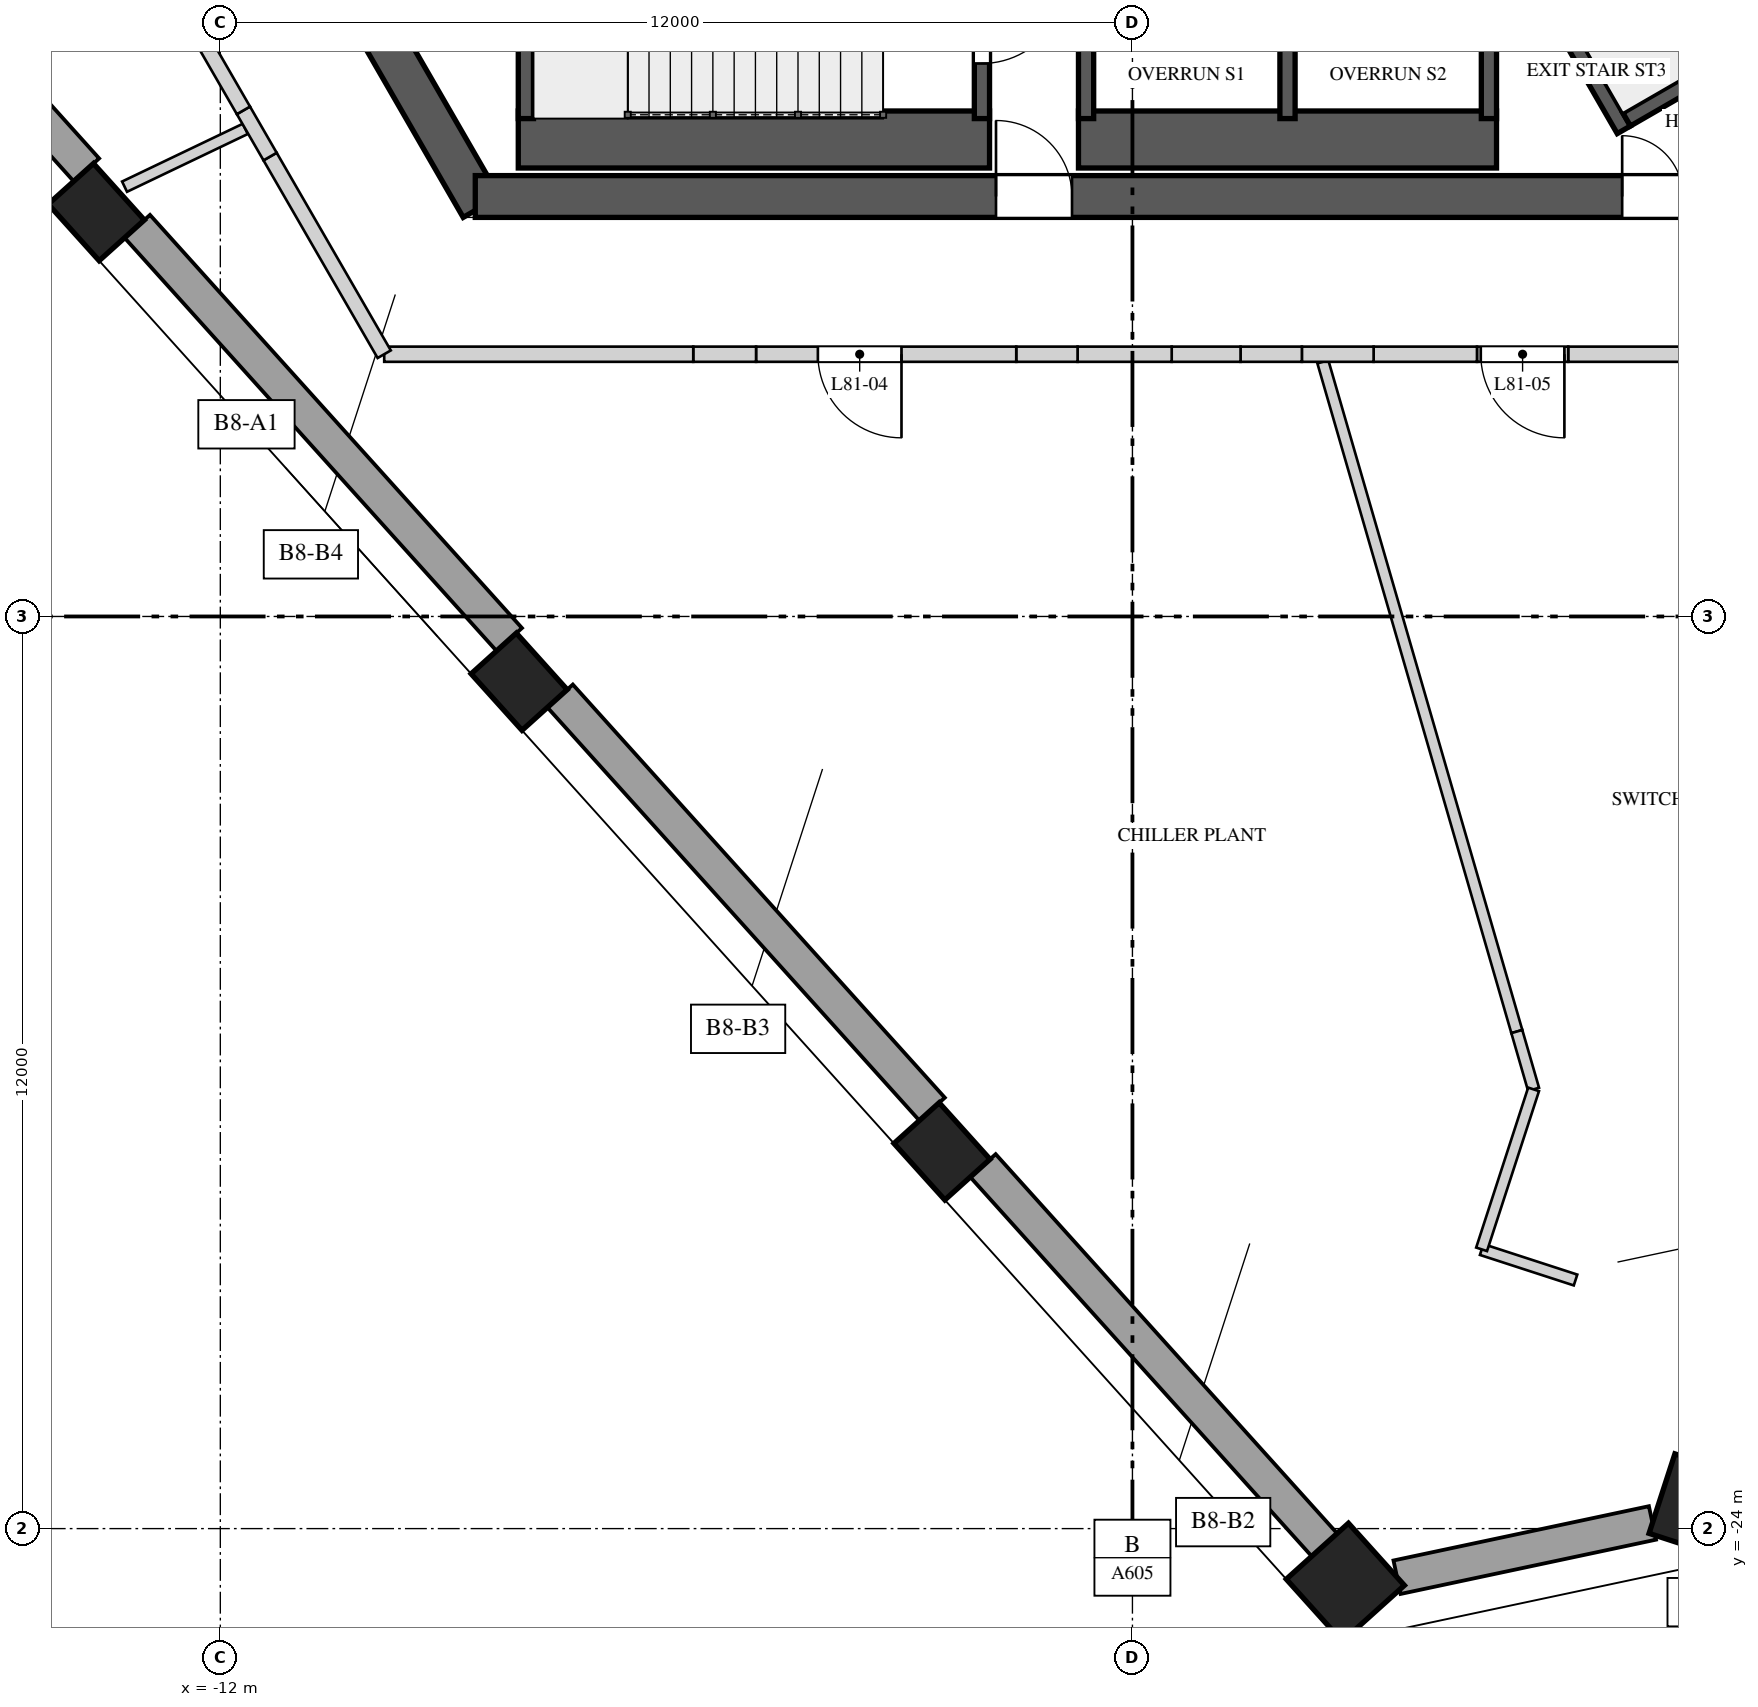
"""IFC4 building model, lengths in metres.
Left out: names, types, materials, properties, quantities, classifications, styles, units other than length and angle.
Written with IfcOpenShell. Run it as: python <this file> out.ifc"""

import sys

from ifc_helpers import new_model, si_unit, direction, frame, frame_2d, origin, origin_2d, place, context, subcontext, project, spatial, polyline, rectangle, outline, extrude, element, fill, save


model = new_model("IFC4")
c1 = context("Model", 3, precision=1e-05, world=origin(), true_north=direction((0.0, 1.0)))
c2 = subcontext(c1, "Body", "Model", "MODEL_VIEW")
j1 = project(units=[si_unit("LENGTHUNIT", "METRE"), si_unit("PLANEANGLEUNIT", "RADIAN")], contexts=[c1])
p1 = place(None, origin())
s1 = spatial("IfcSite", under=j1, at=p1, CompositionType="ELEMENT")
p2 = place(p1, origin())
s2 = spatial("IfcBuilding", under=s1, at=p2, CompositionType="ELEMENT")
p3 = place(p2, frame((0.0, 0.0, 352.4)))
s3 = spatial("IfcBuildingStorey", under=s2, at=p3, CompositionType="ELEMENT", Elevation=352.4)
p4 = place(p3, frame((-10.01, -4.113, 0.0), z_axis=(0.0, 0.0, 1.0), x_axis=(0.499995765644, -0.866027848477, 0.0)))
e1 = element("IfcWall", 1, at=p4, inside=s3, PredefinedType="SHEAR", context=c2, shape_type="SweptSolid", body=[
    extrude(rectangle(XDim=2.887, YDim=0.55, at=frame_2d((1.443, 0.0))), origin(), (0.0, 0.0, 1.0), 4.5),
])
p5 = place(p3, frame((-8.646, -6.475, 0.0), z_axis=(0.0, 0.0, 1.0), x_axis=(1.0, 0.0, 0.0)))
e2 = element("IfcWall", 2, at=p5, inside=s3, PredefinedType="SHEAR", context=c2, shape_type="SweptSolid", body=[
    extrude(rectangle(XDim=17.292, YDim=0.55, at=frame_2d((8.646, 0.0))), origin(), (0.0, 0.0, 1.0), 4.5),
])
p6 = place(p5, frame((6.851, 0.0, 0.0)))
e3 = element("IfcOpeningElement", 3, at=p6, cuts=e2, PredefinedType="OPENING", context=c2, shape_type="SweptSolid", body=[
    extrude(rectangle(XDim=1.0, YDim=2.4, at=frame_2d((0.5, 1.2))), frame((0.0, 0.285, 0.0), z_axis=(0.0, -1.0, 0.0), x_axis=(1.0, 0.0, 0.0)), (0.0, 0.0, 1.0), 0.57),
])
p7 = place(p5, frame((15.089, 0.0, 0.0)))
e4 = element("IfcOpeningElement", 4, at=p7, cuts=e2, PredefinedType="OPENING", context=c2, shape_type="SweptSolid", body=[
    extrude(rectangle(XDim=0.8, YDim=2.1, at=frame_2d((0.4, 1.05))), frame((0.0, 0.285, 0.0), z_axis=(0.0, -1.0, 0.0), x_axis=(1.0, 0.0, 0.0)), (0.0, 0.0, 1.0), 0.57),
])
for number, where, z_axis, x_axis in (
    (5, (-13.631, -6.68, 0.0), (0.0, 0.0, 1.0), (0.669, -0.743, 0.0)),
    (6, (-8.068, -12.858, 0.0), (0.0, 0.0, 1.0), (0.669, -0.743, 0.0)),
    (7, (-2.505, -19.037, 0.0), (0.0, 0.0, 1.0), (0.669, -0.743, 0.0)),
):
    element("IfcColumn", number, at=place(p3, frame(where, z_axis=z_axis, x_axis=x_axis)), inside=s3, PredefinedType="COLUMN", context=c2, shape_type="SweptSolid", body=[
        extrude(rectangle(XDim=1.0, YDim=0.8, at=origin_2d()), origin(), (0.0, 0.0, 1.0), 4.5),
    ])
for number, where, z_axis, x_axis in (
    (8, (2.801, -24.706, 0.0), (0.0, 0.0, 1.0), (0.669, -0.743, 0.0)),
    (9, (7.49, -23.709, 0.0), (0.0, 0.0, 1.0), (0.309, 0.951, 0.0)),
):
    element("IfcColumn", number, at=place(p3, frame(where, z_axis=z_axis, x_axis=x_axis)), inside=s3, PredefinedType="COLUMN", context=c2, shape_type="SweptSolid", body=[
        extrude(rectangle(XDim=1.1, YDim=1.1, at=origin_2d()), origin(), (0.0, 0.0, 1.0), 4.5),
    ])
p8 = place(p3, frame((-18.656, -0.689, 0.0), z_axis=(0.0, 0.0, 1.0), x_axis=(0.669117789535, -0.743156365598, 0.0)))
e10 = element("IfcWall", 10, at=p8, inside=s3, PredefinedType="SOLIDWALL", context=c2, shape_type="SweptSolid", body=[
    extrude(rectangle(XDim=7.314, YDim=0.45, at=frame_2d((3.657, 0.0))), origin(), (0.0, 0.0, 1.0), 3.8),
])
p9 = place(p3, frame((-13.093, -6.868, 0.0), z_axis=(0.0, 0.0, 1.0), x_axis=(0.669136224502, -0.74313976684, 0.0)))
e11 = element("IfcWall", 11, at=p9, inside=s3, PredefinedType="SOLIDWALL", context=c2, shape_type="SweptSolid", body=[
    extrude(rectangle(XDim=7.314, YDim=0.45, at=frame_2d((3.657, 0.0))), origin(), (0.0, 0.0, 1.0), 3.8),
])
p10 = place(p3, frame((-7.53, -13.046, 0.0), z_axis=(0.0, 0.0, 1.0), x_axis=(0.669152823362, -0.743124820597, 0.0)))
e12 = element("IfcWall", 12, at=p10, inside=s3, PredefinedType="SOLIDWALL", context=c2, shape_type="SweptSolid", body=[
    extrude(rectangle(XDim=7.314, YDim=0.45, at=frame_2d((3.657, 0.0))), origin(), (0.0, 0.0, 1.0), 3.8),
])
p11 = place(p3, frame((-1.966, -19.224, 0.0), z_axis=(0.0, 0.0, 1.0), x_axis=(0.66911941145, -0.743154905266, 0.0)))
e13 = element("IfcWall", 13, at=p11, inside=s3, PredefinedType="SOLIDWALL", context=c2, shape_type="SweptSolid", body=[
    extrude(rectangle(XDim=6.714, YDim=0.45, at=frame_2d((3.357, 0.0))), origin(), (0.0, 0.0, 1.0), 3.8),
])
p12 = place(p3, frame((3.481, -24.64, 0.0), z_axis=(0.0, 0.0, 1.0), x_axis=(0.978139158523, 0.207951404333, 0.0)))
e14 = element("IfcWall", 14, at=p12, inside=s3, PredefinedType="SOLIDWALL", context=c2, shape_type="SweptSolid", body=[
    extrude(rectangle(XDim=3.435, YDim=0.45, at=frame_2d((1.718, 0.0))), origin(), (0.0, 0.0, 1.0), 3.8),
])
p13 = place(p3, frame((-8.08, -5.725, 0.0), z_axis=(0.0, 0.0, 1.0), x_axis=(1.0, 0.0, 0.0)))
e15 = element("IfcWall", 15, at=p13, inside=s3, PredefinedType="SOLIDWALL", context=c2, shape_type="SweptSolid", body=[
    extrude(rectangle(XDim=6.2, YDim=0.75, at=frame_2d((3.1, 0.0))), origin(), (0.0, 0.0, 1.0), 4.15),
])
p14 = place(p3, frame((-7.98, -2.9, 0.0), z_axis=(0.0, 0.0, 1.0), x_axis=(0.0, -1.0, 0.0)))
e16 = element("IfcWall", 16, at=p14, inside=s3, PredefinedType="SOLIDWALL", context=c2, shape_type="SweptSolid", body=[
    extrude(rectangle(XDim=2.55, YDim=0.2, at=frame_2d((1.275, 0.0))), origin(), (0.0, 0.0, 1.0), 4.15),
])
p15 = place(p3, frame((-1.98, -2.9, 0.0), z_axis=(0.0, 0.0, 1.0), x_axis=(0.0, -1.0, 0.0)))
e17 = element("IfcWall", 17, at=p15, inside=s3, PredefinedType="SOLIDWALL", context=c2, shape_type="SweptSolid", body=[
    extrude(rectangle(XDim=2.55, YDim=0.2, at=frame_2d((1.275, 0.0))), origin(), (0.0, 0.0, 1.0), 4.15),
])
p16 = place(p15, frame((0.725, 0.0, 0.0)))
e18 = element("IfcOpeningElement", 18, at=p16, cuts=e17, PredefinedType="OPENING", context=c2, shape_type="SweptSolid", body=[
    extrude(rectangle(XDim=1.1, YDim=2.4, at=frame_2d((0.55, 1.2))), frame((0.0, 0.11, 0.0), z_axis=(0.0, -1.0, 0.0), x_axis=(1.0, 0.0, 0.0)), (0.0, 0.0, 1.0), 0.22),
])
p17 = place(p3, frame((6.465, -5.597, 0.0), z_axis=(0.0, 0.0, 1.0), x_axis=(-0.49998037582, 0.866036733513, 0.0)))
e19 = element("IfcWall", 19, at=p17, inside=s3, PredefinedType="SOLIDWALL", context=c2, shape_type="SweptSolid", body=[
    extrude(rectangle(XDim=6.2, YDim=0.2, at=frame_2d((3.1, 0.0))), origin(), (0.0, 0.0, 1.0), 4.15),
])
p18 = place(p3, frame((6.501, -5.461, 0.0), z_axis=(0.0, 0.0, 1.0), x_axis=(0.865989465428, 0.500062241894, 0.0)))
e20 = element("IfcWall", 20, at=p18, inside=s3, PredefinedType="SOLIDWALL", context=c2, shape_type="SweptSolid", body=[
    extrude(rectangle(XDim=2.55, YDim=0.2, at=frame_2d((1.275, 0.0))), origin(), (0.0, 0.0, 1.0), 4.15),
])
p19 = place(p3, frame((-0.71, -5.725, 0.0), z_axis=(0.0, 0.0, 1.0), x_axis=(1.0, 0.0, 0.0)))
e21 = element("IfcWall", 21, at=p19, inside=s3, PredefinedType="SOLIDWALL", context=c2, shape_type="SweptSolid", body=[
    extrude(rectangle(XDim=5.5, YDim=0.75, at=frame_2d((2.75, 0.0))), origin(), (0.0, 0.0, 1.0), 4.15),
])
for number, where, z_axis, x_axis in (
    (22, (-0.61, -3.9, 0.0), (0.0, 0.0, 1.0), (0.0, -1.0, 0.0)),
    (23, (2.04, -3.9, 0.0), (0.0, 0.0, 1.0), (0.0, -1.0, 0.0)),
    (24, (4.69, -3.9, 0.0), (0.0, 0.0, 1.0), (0.0, -1.0, 0.0)),
):
    element("IfcWall", number, at=place(p3, frame(where, z_axis=z_axis, x_axis=x_axis)), inside=s3, PredefinedType="SOLIDWALL", context=c2, shape_type="SweptSolid", body=[
        extrude(rectangle(XDim=1.55, YDim=0.2, at=frame_2d((0.775, 0.0))), origin(), (0.0, 0.0, 1.0), 4.15),
    ])
p20 = place(p3, frame((-11.671, -5.585, 0.0), z_axis=(0.0, 0.0, 1.0), x_axis=(-0.902028626859, -0.431676217003, 0.0)))
e25 = element("IfcWall", 25, at=p20, inside=s3, PredefinedType="PARTITIONING", context=c2, shape_type="SweptSolid", body=[
    extrude(rectangle(XDim=1.761, YDim=0.15, at=frame_2d((0.881, 0.0))), origin(), (0.0, 0.0, 1.0), 3.45),
])
p21 = place(p3, frame((2.505, -8.65, 0.0), z_axis=(0.0, 0.0, 1.0), x_axis=(0.278185386407, -0.960527402415, 0.0)))
e26 = element("IfcWall", 26, at=p21, inside=s3, PredefinedType="PARTITIONING", context=c2, shape_type="SweptSolid", body=[
    extrude(rectangle(XDim=9.173, YDim=0.15, at=frame_2d((4.586, 0.0))), origin(), (0.0, 0.0, 1.0), 3.05),
])
p22 = place(p3, frame((5.057, -17.461, 0.0), z_axis=(0.0, 0.0, 1.0), x_axis=(0.278222842465, -0.960516553699, 0.0)))
e27 = element("IfcWall", 27, at=p22, inside=s3, PredefinedType="PARTITIONING", context=c2, shape_type="SweptSolid", body=[
    extrude(rectangle(XDim=0.792, YDim=0.15, at=frame_2d((0.396, 0.0))), origin(), (0.0, 0.0, 1.0), 4.15),
])
p23 = place(p3, frame((4.595, -20.328, 0.0), z_axis=(0.0, 0.0, 1.0), x_axis=(0.951063088132, -0.308996767609, 0.0)))
e28 = element("IfcWall", 28, at=p23, inside=s3, PredefinedType="PARTITIONING", context=c2, shape_type="SweptSolid", body=[
    extrude(rectangle(XDim=1.298, YDim=0.15, at=frame_2d((0.649, 0.0))), origin(), (0.0, 0.0, 1.0), 4.15),
])
p24 = place(p3, frame((5.277, -18.221, 0.0), z_axis=(0.0, 0.0, 1.0), x_axis=(-0.309036176758, -0.951050283347, 0.0)))
e29 = element("IfcWall", 29, at=p24, inside=s3, PredefinedType="PARTITIONING", context=c2, shape_type="SweptSolid", body=[
    extrude(rectangle(XDim=2.213, YDim=0.15, at=frame_2d((1.106, 0.0))), origin(), (0.0, 0.0, 1.0), 4.15),
])
p25 = place(p3, frame((9.844, -8.55, 0.0), z_axis=(0.0, 0.0, 1.0), x_axis=(-1.0, 0.0, 0.0)))
e30 = element("IfcWall", 30, at=p25, inside=s3, PredefinedType="SOLIDWALL", context=c2, shape_type="SweptSolid", body=[
    extrude(rectangle(XDim=4.111, YDim=0.2, at=frame_2d((2.055, 0.0))), origin(), (0.0, 0.0, 1.0), 4.15),
])
p26 = place(p3, frame((5.733, -8.55, 0.0), z_axis=(0.0, 0.0, 1.0), x_axis=(-1.0, 0.0, 0.0)))
e31 = element("IfcWall", 31, at=p26, inside=s3, PredefinedType="SOLIDWALL", context=c2, shape_type="SweptSolid", body=[
    extrude(outline(polyline([(0.0, 0.0), (1.2, 0.0), (1.2, 4.15), (0.905, 4.15), (0.905, 3.45), (0.0, 3.45), (0.0, 0.0)])), frame((0.0, 0.1, 0.0), z_axis=(0.0, -1.0, 0.0), x_axis=(1.0, 0.0, 0.0)), (0.0, 0.0, 1.0), 0.2),
])
p27 = place(p26, frame((0.05, 0.0, 0.0)))
e32 = element("IfcOpeningElement", 32, at=p27, cuts=e31, PredefinedType="OPENING", context=c2, shape_type="SweptSolid", body=[
    extrude(rectangle(XDim=1.1, YDim=2.4, at=frame_2d((0.55, 1.2))), frame((0.0, 0.11, 0.0), z_axis=(0.0, -1.0, 0.0), x_axis=(1.0, 0.0, 0.0)), (0.0, 0.0, 1.0), 0.22),
])
p28 = place(p3, frame((4.533, -8.55, 0.0), z_axis=(0.0, 0.0, 1.0), x_axis=(-1.0, 0.0, 0.0)))
e33 = element("IfcWall", 33, at=p28, inside=s3, PredefinedType="SOLIDWALL", context=c2, shape_type="SweptSolid", body=[
    extrude(rectangle(XDim=1.36, YDim=0.2, at=frame_2d((0.68, 0.0))), origin(), (0.0, 0.0, 1.0), 4.15),
])
p29 = place(p3, frame((3.173, -8.55, 0.0), z_axis=(0.0, 0.0, 1.0), x_axis=(-1.0, 0.0, 0.0)))
e34 = element("IfcWall", 34, at=p29, inside=s3, PredefinedType="SOLIDWALL", context=c2, shape_type="SweptSolid", body=[
    extrude(rectangle(XDim=0.944, YDim=0.2, at=frame_2d((0.472, 0.0))), origin(), (0.0, 0.0, 1.0), 3.05),
])
p30 = place(p3, frame((2.229, -8.55, 0.0), z_axis=(0.0, 0.0, 1.0), x_axis=(-1.0, 0.0, 0.0)))
e35 = element("IfcWall", 35, at=p30, inside=s3, PredefinedType="SOLIDWALL", context=c2, shape_type="SweptSolid", body=[
    extrude(rectangle(XDim=0.807, YDim=0.2, at=frame_2d((0.403, 0.0))), origin(), (0.0, 0.0, 1.0), 4.15),
])
p31 = place(p3, frame((1.422, -8.55, 0.0), z_axis=(0.0, 0.0, 1.0), x_axis=(-1.0, 0.0, 0.0)))
e36 = element("IfcWall", 36, at=p31, inside=s3, PredefinedType="SOLIDWALL", context=c2, shape_type="SweptSolid", body=[
    extrude(rectangle(XDim=0.906, YDim=0.2, at=frame_2d((0.453, 0.0))), origin(), (0.0, 0.0, 1.0), 3.05),
])
p32 = place(p3, frame((0.517, -8.55, 0.0), z_axis=(0.0, 0.0, 1.0), x_axis=(-1.0, 0.0, 0.0)))
e37 = element("IfcWall", 37, at=p32, inside=s3, PredefinedType="SOLIDWALL", context=c2, shape_type="SweptSolid", body=[
    extrude(rectangle(XDim=1.238, YDim=0.2, at=frame_2d((0.619, 0.0))), origin(), (0.0, 0.0, 1.0), 4.15),
])
p33 = place(p3, frame((-0.722, -8.55, 0.0), z_axis=(0.0, 0.0, 1.0), x_axis=(-1.0, 0.0, 0.0)))
e38 = element("IfcWall", 38, at=p33, inside=s3, PredefinedType="SOLIDWALL", context=c2, shape_type="SweptSolid", body=[
    extrude(rectangle(XDim=0.807, YDim=0.2, at=frame_2d((0.403, 0.0))), origin(), (0.0, 0.0, 1.0), 3.25),
])
p34 = place(p3, frame((-1.529, -8.55, 0.0), z_axis=(0.0, 0.0, 1.0), x_axis=(-1.0, 0.0, 0.0)))
e39 = element("IfcWall", 39, at=p34, inside=s3, PredefinedType="SOLIDWALL", context=c2, shape_type="SweptSolid", body=[
    extrude(rectangle(XDim=3.423, YDim=0.2, at=frame_2d((1.711, 0.0))), origin(), (0.0, 0.0, 1.0), 4.15),
])
p35 = place(p34, frame((1.51, 0.0, 0.0)))
e40 = element("IfcOpeningElement", 40, at=p35, cuts=e39, PredefinedType="OPENING", context=c2, shape_type="SweptSolid", body=[
    extrude(rectangle(XDim=1.1, YDim=2.4, at=frame_2d((0.55, 1.2))), frame((0.0, 0.11, 0.0), z_axis=(0.0, -1.0, 0.0), x_axis=(1.0, 0.0, 0.0)), (0.0, 0.0, 1.0), 0.22),
])
p36 = place(p3, frame((-4.952, -8.55, 0.0), z_axis=(0.0, 0.0, 1.0), x_axis=(-1.0, 0.0, 0.0)))
e41 = element("IfcWall", 41, at=p36, inside=s3, PredefinedType="SOLIDWALL", context=c2, shape_type="SweptSolid", body=[
    extrude(rectangle(XDim=0.826, YDim=0.2, at=frame_2d((0.413, 0.0))), origin(), (0.0, 0.0, 1.0), 3.45),
])
p37 = place(p3, frame((-5.778, -8.55, 0.0), z_axis=(0.0, 0.0, 1.0), x_axis=(-1.0, 0.0, 0.0)))
e42 = element("IfcWall", 42, at=p37, inside=s3, PredefinedType="SOLIDWALL", context=c2, shape_type="SweptSolid", body=[
    extrude(rectangle(XDim=4.066, YDim=0.2, at=frame_2d((2.033, 0.0))), origin(), (0.0, 0.0, 1.0), 4.15),
])
p38 = place(p3, frame((-9.844, -8.55, 0.0), z_axis=(0.0, 0.0, 1.0), x_axis=(-0.500003959331, 0.866023117852, 0.0)))
e43 = element("IfcWall", 43, at=p38, inside=s3, PredefinedType="SOLIDWALL", context=c2, shape_type="SweptSolid", body=[
    extrude(rectangle(XDim=3.003, YDim=0.2, at=frame_2d((1.501, 0.0))), origin(), (0.0, 0.0, 1.0), 4.15),
])
p39 = place(p3, frame((-11.345, -5.949, 0.0), z_axis=(0.0, 0.0, 1.0), x_axis=(-0.499993523031, 0.866029143232, 0.0)))
e44 = element("IfcWall", 44, at=p39, inside=s3, PredefinedType="SOLIDWALL", context=c2, shape_type="SweptSolid", body=[
    extrude(rectangle(XDim=0.702, YDim=0.2, at=frame_2d((0.351, 0.0))), origin(), (0.0, 0.0, 1.0), 3.45),
])
p40 = place(p3, frame((-11.696, -5.342, 0.0), z_axis=(0.0, 0.0, 1.0), x_axis=(-0.500013012896, 0.866017890655, 0.0)))
e45 = element("IfcWall", 45, at=p40, inside=s3, PredefinedType="SOLIDWALL", context=c2, shape_type="SweptSolid", body=[
    extrude(rectangle(XDim=1.261, YDim=0.2, at=frame_2d((0.63, 0.0))), origin(), (0.0, 0.0, 1.0), 4.15),
])
p41 = place(p16, origin())
e46 = element("IfcDoor", 46, at=p41, inside=s3, OperationType="SINGLE_SWING_LEFT", PredefinedType="DOOR", context=c2, shape_type="SweptSolid", body=[
    extrude(rectangle(XDim=1.1, YDim=2.4, at=frame_2d((0.55, 1.2))), frame((0.0, 0.025, 0.0), z_axis=(0.0, -1.0, 0.0), x_axis=(1.0, 0.0, 0.0)), (0.0, 0.0, 1.0), 0.05),
])
fill(e18, e46)
p42 = place(p6, origin())
e47 = element("IfcDoor", 47, at=p42, inside=s3, OperationType="SINGLE_SWING_LEFT", PredefinedType="DOOR", context=c2, shape_type="SweptSolid", body=[
    extrude(rectangle(XDim=1.0, YDim=2.4, at=frame_2d((0.5, 1.2))), frame((0.0, 0.025, 0.0), z_axis=(0.0, -1.0, 0.0), x_axis=(1.0, 0.0, 0.0)), (0.0, 0.0, 1.0), 0.05),
])
fill(e3, e47)
p43 = place(p7, origin())
e48 = element("IfcDoor", 48, at=p43, inside=s3, OperationType="SINGLE_SWING_LEFT", PredefinedType="DOOR", context=c2, shape_type="SweptSolid", body=[
    extrude(rectangle(XDim=0.8, YDim=2.1, at=frame_2d((0.4, 1.05))), frame((0.0, 0.025, 0.0), z_axis=(0.0, -1.0, 0.0), x_axis=(1.0, 0.0, 0.0)), (0.0, 0.0, 1.0), 0.05),
])
fill(e4, e48)
p44 = place(p35, origin())
e49 = element("IfcDoor", 49, at=p44, inside=s3, OperationType="SINGLE_SWING_RIGHT", PredefinedType="DOOR", context=c2, shape_type="SweptSolid", body=[
    extrude(rectangle(XDim=1.1, YDim=2.4, at=frame_2d((0.55, 1.2))), frame((0.0, 0.025, 0.0), z_axis=(0.0, -1.0, 0.0), x_axis=(1.0, 0.0, 0.0)), (0.0, 0.0, 1.0), 0.05),
])
fill(e40, e49)
p45 = place(p27, origin())
e50 = element("IfcDoor", 50, at=p45, inside=s3, OperationType="SINGLE_SWING_LEFT", PredefinedType="DOOR", context=c2, shape_type="SweptSolid", body=[
    extrude(rectangle(XDim=1.1, YDim=2.4, at=frame_2d((0.55, 1.2))), frame((0.0, 0.025, 0.0), z_axis=(0.0, -1.0, 0.0), x_axis=(1.0, 0.0, 0.0)), (0.0, 0.0, 1.0), 0.05),
])
fill(e32, e50)
save(model, sys.argv[1])
